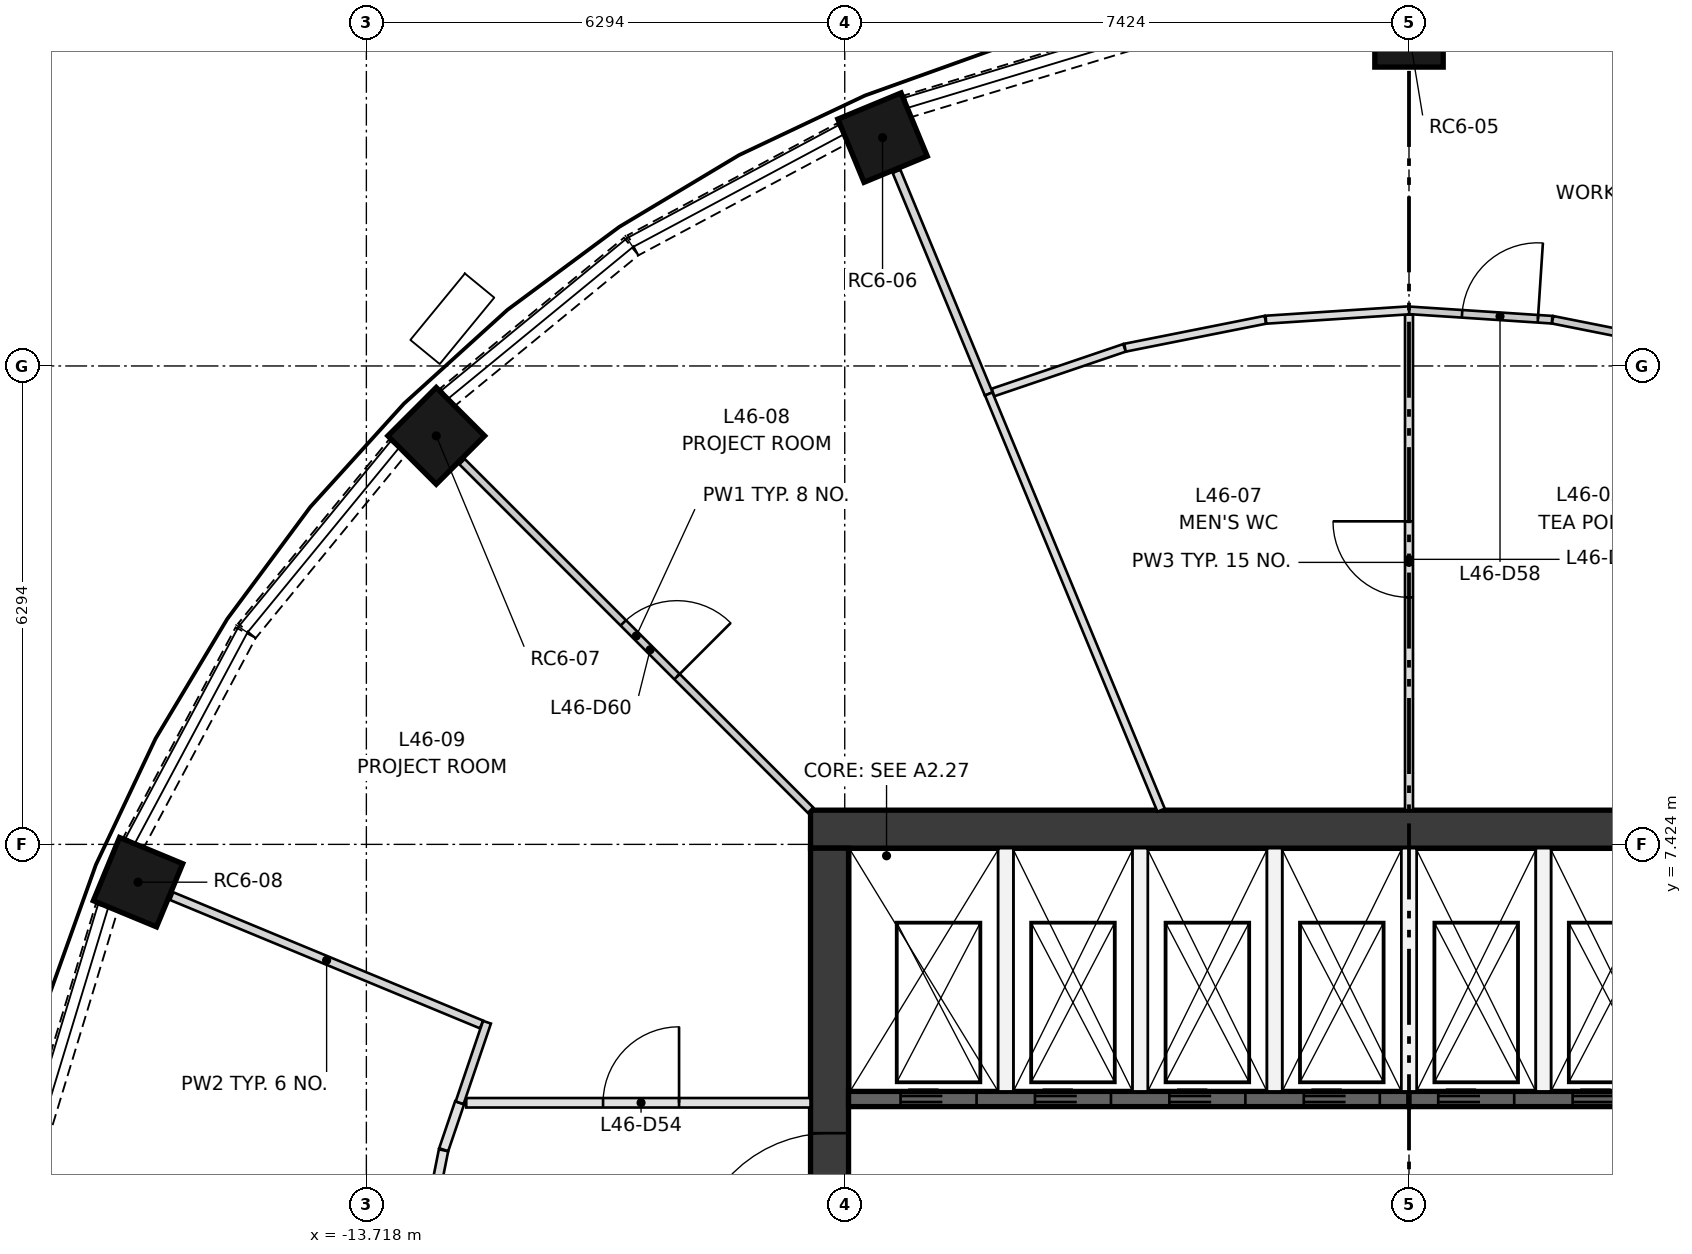
"""IFC4 building model, lengths in metres.
Left out: names, types, materials, properties, quantities, classifications, styles, units other than length and angle.
Written with IfcOpenShell. Run it as: python <this file> out.ifc"""

import sys

from ifc_helpers import new_model, si_unit, direction, frame, frame_2d, origin, origin_2d, place, context, subcontext, project, spatial, rectangle, extrude, element, fill, save


model = new_model("IFC4")
c1 = context("Model", 3, precision=1e-05, world=origin(), true_north=direction((0.0, 1.0)))
c2 = subcontext(c1, "Body", "Model", "MODEL_VIEW")
j1 = project(units=[si_unit("LENGTHUNIT", "METRE"), si_unit("PLANEANGLEUNIT", "RADIAN")], contexts=[c1])
p1 = place(None, origin())
s1 = spatial("IfcSite", under=j1, at=p1, CompositionType="ELEMENT")
p2 = place(p1, origin())
s2 = spatial("IfcBuilding", under=s1, at=p2, CompositionType="ELEMENT")
p3 = place(p2, frame((0.0, 0.0, 174.25)))
s3 = spatial("IfcBuildingStorey", under=s2, at=p3, CompositionType="ELEMENT", Elevation=174.25)
for number, where, z_axis, x_axis in (
    (1, (0.0, 18.1, 0.0), (0.0, 0.0, 1.0), (0.0, 1.0, 0.0)),
    (2, (-6.927, 16.722, 0.0), (0.0, 0.0, 1.0), (-0.383, 0.924, 0.0)),
    (3, (-12.799, 12.799, 0.0), (0.0, 0.0, 1.0), (-0.707, 0.707, 0.0)),
    (4, (-16.722, 6.927, 0.0), (0.0, 0.0, 1.0), (-0.924, 0.383, 0.0)),
):
    element("IfcColumn", number, at=place(p3, frame(where, z_axis=z_axis, x_axis=x_axis)), inside=s3, PredefinedType="COLUMN", context=c2, shape_type="SweptSolid", body=[
        extrude(rectangle(XDim=0.9, YDim=0.9, at=origin_2d()), origin(), (0.0, 0.0, 1.0), 3.35),
    ])
p4 = place(p3, frame((-7.874, 7.624, 0.0), z_axis=(0.0, 0.0, 1.0), x_axis=(1.0, 0.0, 0.0)))
e5 = element("IfcWall", 5, at=p4, inside=s3, PredefinedType="SHEAR", context=c2, shape_type="SweptSolid", body=[
    extrude(rectangle(XDim=15.748, YDim=0.5, at=frame_2d((7.874, 0.0))), origin(), (0.0, 0.0, 1.0), 3.35),
])
p5 = place(p3, frame((-7.624, -7.374, 0.0), z_axis=(0.0, 0.0, 1.0), x_axis=(0.0, 1.0, 0.0)))
e6 = element("IfcWall", 6, at=p5, inside=s3, PredefinedType="SHEAR", context=c2, shape_type="SweptSolid", body=[
    extrude(rectangle(XDim=14.748, YDim=0.5, at=frame_2d((7.374, 0.0))), origin(), (0.0, 0.0, 1.0), 3.35),
])
p6 = place(p5, frame((6.874, 0.0, 0.0)))
e7 = element("IfcOpeningElement", 7, at=p6, cuts=e6, PredefinedType="OPENING", context=c2, shape_type="SweptSolid", body=[
    extrude(rectangle(XDim=1.0, YDim=2.1, at=frame_2d((0.5, 1.05))), frame((0.0, 0.26, 0.0), z_axis=(0.0, -1.0, 0.0), x_axis=(1.0, 0.0, 0.0)), (0.0, 0.0, 1.0), 0.52),
])
p7 = place(p5, frame((3.75, 0.0, 0.0)))
e8 = element("IfcOpeningElement", 8, at=p7, cuts=e6, PredefinedType="OPENING", context=c2, shape_type="SweptSolid", body=[
    extrude(rectangle(XDim=1.8, YDim=2.1, at=frame_2d((0.9, 1.05))), frame((0.0, 0.26, 0.0), z_axis=(0.0, -1.0, 0.0), x_axis=(1.0, 0.0, 0.0)), (0.0, 0.0, 1.0), 0.52),
])
p8 = place(p5, frame((9.198, 0.0, 0.0)))
e9 = element("IfcOpeningElement", 9, at=p8, cuts=e6, PredefinedType="OPENING", context=c2, shape_type="SweptSolid", body=[
    extrude(rectangle(XDim=1.8, YDim=2.1, at=frame_2d((0.9, 1.05))), frame((0.0, 0.26, 0.0), z_axis=(0.0, -1.0, 0.0), x_axis=(1.0, 0.0, 0.0)), (0.0, 0.0, 1.0), 0.52),
])
p9 = place(p3, frame((-7.374, 4.074, 0.0), z_axis=(0.0, 0.0, 1.0), x_axis=(1.0, 0.0, 0.0)))
e10 = element("IfcWall", 10, at=p9, inside=s3, PredefinedType="SHEAR", context=c2, shape_type="SweptSolid", body=[
    extrude(rectangle(XDim=7.374, YDim=0.2, at=frame_2d((3.687, 0.0))), origin(), (0.0, 0.0, 1.0), 3.0),
])
p10 = place(p9, frame((0.684, 0.0, 0.0)))
e11 = element("IfcOpeningElement", 11, at=p10, cuts=e10, PredefinedType="OPENING", context=c2, shape_type="SweptSolid", body=[
    extrude(rectangle(XDim=1.0, YDim=2.1, at=frame_2d((0.5, 1.05))), frame((0.0, 0.11, 0.0), z_axis=(0.0, -1.0, 0.0), x_axis=(1.0, 0.0, 0.0)), (0.0, 0.0, 1.0), 0.22),
])
p11 = place(p9, frame((2.453, 0.0, 0.0)))
e12 = element("IfcOpeningElement", 12, at=p11, cuts=e10, PredefinedType="OPENING", context=c2, shape_type="SweptSolid", body=[
    extrude(rectangle(XDim=1.0, YDim=2.1, at=frame_2d((0.5, 1.05))), frame((0.0, 0.11, 0.0), z_axis=(0.0, -1.0, 0.0), x_axis=(1.0, 0.0, 0.0)), (0.0, 0.0, 1.0), 0.22),
])
p12 = place(p9, frame((4.221, 0.0, 0.0)))
e13 = element("IfcOpeningElement", 13, at=p12, cuts=e10, PredefinedType="OPENING", context=c2, shape_type="SweptSolid", body=[
    extrude(rectangle(XDim=1.0, YDim=2.1, at=frame_2d((0.5, 1.05))), frame((0.0, 0.11, 0.0), z_axis=(0.0, -1.0, 0.0), x_axis=(1.0, 0.0, 0.0)), (0.0, 0.0, 1.0), 0.22),
])
p13 = place(p9, frame((5.99, 0.0, 0.0)))
e14 = element("IfcOpeningElement", 14, at=p13, cuts=e10, PredefinedType="OPENING", context=c2, shape_type="SweptSolid", body=[
    extrude(rectangle(XDim=1.0, YDim=2.1, at=frame_2d((0.5, 1.05))), frame((0.0, 0.11, 0.0), z_axis=(0.0, -1.0, 0.0), x_axis=(1.0, 0.0, 0.0)), (0.0, 0.0, 1.0), 0.22),
])
p14 = place(p3, frame((0.0, 4.074, 0.0), z_axis=(0.0, 0.0, 1.0), x_axis=(1.0, 0.0, 0.0)))
e15 = element("IfcWall", 15, at=p14, inside=s3, PredefinedType="SHEAR", context=c2, shape_type="SweptSolid", body=[
    extrude(rectangle(XDim=7.374, YDim=0.2, at=frame_2d((3.687, 0.0))), origin(), (0.0, 0.0, 1.0), 3.0),
])
p15 = place(p14, frame((0.384, 0.0, 0.0)))
e16 = element("IfcOpeningElement", 16, at=p15, cuts=e15, PredefinedType="OPENING", context=c2, shape_type="SweptSolid", body=[
    extrude(rectangle(XDim=1.0, YDim=2.1, at=frame_2d((0.5, 1.05))), frame((0.0, 0.11, 0.0), z_axis=(0.0, -1.0, 0.0), x_axis=(1.0, 0.0, 0.0)), (0.0, 0.0, 1.0), 0.22),
])
p16 = place(p14, frame((2.153, 0.0, 0.0)))
e17 = element("IfcOpeningElement", 17, at=p16, cuts=e15, PredefinedType="OPENING", context=c2, shape_type="SweptSolid", body=[
    extrude(rectangle(XDim=1.0, YDim=2.1, at=frame_2d((0.5, 1.05))), frame((0.0, 0.11, 0.0), z_axis=(0.0, -1.0, 0.0), x_axis=(1.0, 0.0, 0.0)), (0.0, 0.0, 1.0), 0.22),
])
p17 = place(p14, frame((3.921, 0.0, 0.0)))
e18 = element("IfcOpeningElement", 18, at=p17, cuts=e15, PredefinedType="OPENING", context=c2, shape_type="SweptSolid", body=[
    extrude(rectangle(XDim=1.0, YDim=2.1, at=frame_2d((0.5, 1.05))), frame((0.0, 0.11, 0.0), z_axis=(0.0, -1.0, 0.0), x_axis=(1.0, 0.0, 0.0)), (0.0, 0.0, 1.0), 0.22),
])
p18 = place(p14, frame((5.79, 0.0, 0.0)))
e19 = element("IfcOpeningElement", 19, at=p18, cuts=e15, PredefinedType="OPENING", context=c2, shape_type="SweptSolid", body=[
    extrude(rectangle(XDim=0.8, YDim=2.1, at=frame_2d((0.4, 1.05))), frame((0.0, 0.11, 0.0), z_axis=(0.0, -1.0, 0.0), x_axis=(1.0, 0.0, 0.0)), (0.0, 0.0, 1.0), 0.22),
])
for number, where, z_axis, x_axis in (
    (20, (-5.305, 4.174, 0.0), (0.0, 0.0, 1.0), (0.0, 1.0, 0.0)),
    (21, (-3.537, 4.174, 0.0), (0.0, 0.0, 1.0), (0.0, 1.0, 0.0)),
    (22, (-1.769, 4.174, 0.0), (0.0, 0.0, 1.0), (0.0, 1.0, 0.0)),
    (23, (0.0, 4.174, 0.0), (0.0, 0.0, 1.0), (0.0, 1.0, 0.0)),
    (24, (1.769, 4.174, 0.0), (0.0, 0.0, 1.0), (0.0, 1.0, 0.0)),
):
    element("IfcWall", number, at=place(p3, frame(where, z_axis=z_axis, x_axis=x_axis)), inside=s3, PredefinedType="PARTITIONING", context=c2, shape_type="SweptSolid", body=[
        extrude(rectangle(XDim=3.2, YDim=0.2, at=frame_2d((1.6, 0.0))), origin(), (0.0, 0.0, 1.0), 3.0),
    ])
p19 = place(p3, frame((-3.604, 18.042, 0.0), z_axis=(0.0, 0.0, 1.0), x_axis=(-0.957001416136, -0.290083245834, 0.0)))
e25 = element("IfcWall", 25, at=p19, inside=s3, PredefinedType="SOLIDWALL", context=c2, shape_type="SweptSolid", body=[
    extrude(rectangle(XDim=3.127, YDim=0.3, at=frame_2d((1.563, 0.0))), origin(), (0.0, 0.0, 1.0), 0.9),
])
p20 = place(p3, frame((-7.452, 16.779, 0.0), z_axis=(0.0, 0.0, 1.0), x_axis=(-0.882024038027, -0.47120441036, 0.0)))
e26 = element("IfcWall", 26, at=p20, inside=s3, PredefinedType="SOLIDWALL", context=c2, shape_type="SweptSolid", body=[
    extrude(rectangle(XDim=3.125, YDim=0.3, at=frame_2d((1.562, 0.0))), origin(), (0.0, 0.0, 1.0), 0.9),
])
for number, where, z_axis, x_axis in (
    (27, (-10.234, 15.29, 0.0), (0.0, 0.0, 1.0), (-0.773, -0.634, 0.0)),
    (28, (-13.306, 12.651, 0.0), (0.0, 0.0, 1.0), (-0.634, -0.773, 0.0)),
):
    element("IfcWall", number, at=place(p3, frame(where, z_axis=z_axis, x_axis=x_axis)), inside=s3, PredefinedType="SOLIDWALL", context=c2, shape_type="SweptSolid", body=[
        extrude(rectangle(XDim=3.127, YDim=0.3, at=frame_2d((1.563, 0.0))), origin(), (0.0, 0.0, 1.0), 0.9),
    ])
p21 = place(p3, frame((-15.306, 10.209, 0.0), z_axis=(0.0, 0.0, 1.0), x_axis=(-0.47120441036, -0.882024038027, 0.0)))
e29 = element("IfcWall", 29, at=p21, inside=s3, PredefinedType="SOLIDWALL", context=c2, shape_type="SweptSolid", body=[
    extrude(rectangle(XDim=3.125, YDim=0.3, at=frame_2d((1.562, 0.0))), origin(), (0.0, 0.0, 1.0), 0.9),
])
p22 = place(p3, frame((-17.135, 6.596, 0.0), z_axis=(0.0, 0.0, 1.0), x_axis=(-0.290083245834, -0.957001416136, 0.0)))
e30 = element("IfcWall", 30, at=p22, inside=s3, PredefinedType="SOLIDWALL", context=c2, shape_type="SweptSolid", body=[
    extrude(rectangle(XDim=3.127, YDim=0.3, at=frame_2d((1.563, 0.0))), origin(), (0.0, 0.0, 1.0), 0.9),
])
p23 = place(p3, frame((-12.404, 4.024, 0.0), z_axis=(0.0, 0.0, 1.0), x_axis=(1.0, 0.0, 0.0)))
e31 = element("IfcWall", 31, at=p23, inside=s3, PredefinedType="PARTITIONING", context=c2, shape_type="SweptSolid", body=[
    extrude(rectangle(XDim=4.53, YDim=0.125, at=frame_2d((2.265, 0.0))), origin(), (0.0, 0.0, 1.0), 3.0),
])
p24 = place(p23, frame((1.8, 0.0, 0.0)))
e32 = element("IfcOpeningElement", 32, at=p24, cuts=e31, PredefinedType="OPENING", context=c2, shape_type="SweptSolid", body=[
    extrude(rectangle(XDim=1.0, YDim=2.1, at=frame_2d((0.5, 1.05))), frame((0.0, 0.073, 0.0), z_axis=(0.0, -1.0, 0.0), x_axis=(1.0, 0.0, 0.0)), (0.0, 0.0, 1.0), 0.145),
])
p25 = place(p3, frame((-13.037, 1.72, 0.0), z_axis=(0.0, 0.0, 1.0), x_axis=(0.195101249107, 0.980783106806, 0.0)))
e33 = element("IfcWall", 33, at=p25, inside=s3, PredefinedType="PARTITIONING", context=c2, shape_type="SweptSolid", body=[
    extrude(rectangle(XDim=1.712, YDim=0.125, at=frame_2d((0.856, 0.0))), origin(), (0.0, 0.0, 1.0), 3.0),
])
p26 = place(p3, frame((-12.701, 3.407, 0.0), z_axis=(0.0, 0.0, 1.0), x_axis=(0.321506357846, 0.946907419902, 0.0)))
e34 = element("IfcWall", 34, at=p26, inside=s3, PredefinedType="PARTITIONING", context=c2, shape_type="SweptSolid", body=[
    extrude(rectangle(XDim=0.652, YDim=0.125, at=frame_2d((0.326, 0.0))), origin(), (0.0, 0.0, 1.0), 3.0),
])
p27 = place(p3, frame((0.0, 14.45, 0.0), z_axis=(0.0, 0.0, 1.0), x_axis=(0.997862900294, -0.065342422802, 0.0)))
e35 = element("IfcWall", 35, at=p27, inside=s3, PredefinedType="PARTITIONING", context=c2, shape_type="SweptSolid", body=[
    extrude(rectangle(XDim=1.887, YDim=0.1, at=frame_2d((0.943, 0.0))), origin(), (0.0, 0.0, 1.0), 3.0),
])
p28 = place(p27, frame((0.7, 0.0, 0.0)))
e36 = element("IfcOpeningElement", 36, at=p28, cuts=e35, PredefinedType="OPENING", context=c2, shape_type="SweptSolid", body=[
    extrude(rectangle(XDim=1.0, YDim=2.1, at=frame_2d((0.5, 1.05))), frame((0.0, 0.06, 0.0), z_axis=(0.0, -1.0, 0.0), x_axis=(1.0, 0.0, 0.0)), (0.0, 0.0, 1.0), 0.12),
])
p29 = place(p3, frame((1.889, 14.326, 0.0), z_axis=(0.0, 0.0, 1.0), x_axis=(0.980789493394, -0.195069140684, 0.0)))
e37 = element("IfcWall", 37, at=p29, inside=s3, PredefinedType="PARTITIONING", context=c2, shape_type="SweptSolid", body=[
    extrude(rectangle(XDim=1.884, YDim=0.1, at=frame_2d((0.942, 0.0))), origin(), (0.0, 0.0, 1.0), 3.0),
])
p30 = place(p3, frame((0.0, 7.874, 0.0), z_axis=(0.0, 0.0, 1.0), x_axis=(0.0, 1.0, 0.0)))
e38 = element("IfcWall", 38, at=p30, inside=s3, PredefinedType="PARTITIONING", context=c2, shape_type="SweptSolid", body=[
    extrude(rectangle(XDim=6.52, YDim=0.105, at=frame_2d((3.26, 0.0))), origin(), (0.0, 0.0, 1.0), 3.0),
])
p31 = place(p30, frame((2.8, 0.0, 0.0)))
e39 = element("IfcOpeningElement", 39, at=p31, cuts=e38, PredefinedType="OPENING", context=c2, shape_type="SweptSolid", body=[
    extrude(rectangle(XDim=1.0, YDim=2.1, at=frame_2d((0.5, 1.05))), frame((0.0, 0.062, 0.0), z_axis=(0.0, -1.0, 0.0), x_axis=(1.0, 0.0, 0.0)), (0.0, 0.0, 1.0), 0.125),
])
p32 = place(p3, frame((-3.743, 13.957, 0.0), z_axis=(0.0, 0.0, 1.0), x_axis=(-0.946932980831, -0.321431065415, 0.0)))
e40 = element("IfcWall", 40, at=p32, inside=s3, PredefinedType="PARTITIONING", context=c2, shape_type="SweptSolid", body=[
    extrude(rectangle(XDim=1.828, YDim=0.105, at=frame_2d((0.914, 0.0))), origin(), (0.0, 0.0, 1.0), 3.0),
])
p33 = place(p3, frame((-1.889, 14.326, 0.0), z_axis=(0.0, 0.0, 1.0), x_axis=(-0.980784560384, -0.195093941763, 0.0)))
e41 = element("IfcWall", 41, at=p33, inside=s3, PredefinedType="PARTITIONING", context=c2, shape_type="SweptSolid", body=[
    extrude(rectangle(XDim=1.883, YDim=0.105, at=frame_2d((0.942, 0.0))), origin(), (0.0, 0.0, 1.0), 3.0),
])
p34 = place(p3, frame((0.0, 14.45, 0.0), z_axis=(0.0, 0.0, 1.0), x_axis=(-0.997862900294, -0.065342422802, 0.0)))
e42 = element("IfcWall", 42, at=p34, inside=s3, PredefinedType="PARTITIONING", context=c2, shape_type="SweptSolid", body=[
    extrude(rectangle(XDim=1.887, YDim=0.105, at=frame_2d((0.943, 0.0))), origin(), (0.0, 0.0, 1.0), 3.0),
])
p35 = place(p3, frame((-5.53, 13.35, 0.0), z_axis=(0.0, 0.0, 1.0), x_axis=(-0.382689618566, 0.923876970079, 0.0)))
e43 = element("IfcWall", 43, at=p35, inside=s3, PredefinedType="PARTITIONING", context=c2, shape_type="SweptSolid", body=[
    extrude(rectangle(XDim=3.17, YDim=0.11, at=frame_2d((1.585, 0.0))), origin(), (0.0, 0.0, 1.0), 3.0),
])
p36 = place(p3, frame((-3.261, 7.874, 0.0), z_axis=(0.0, 0.0, 1.0), x_axis=(-0.382690105068, 0.923876768559, 0.0)))
e44 = element("IfcWall", 44, at=p36, inside=s3, PredefinedType="PARTITIONING", context=c2, shape_type="SweptSolid", body=[
    extrude(rectangle(XDim=5.927, YDim=0.105, at=frame_2d((2.964, 0.0))), origin(), (0.0, 0.0, 1.0), 3.0),
])
p37 = place(p3, frame((-12.459, 12.459, 0.0), z_axis=(0.0, 0.0, 1.0), x_axis=(0.707106781187, -0.707106781187, 0.0)))
e45 = element("IfcWall", 45, at=p37, inside=s3, PredefinedType="PARTITIONING", context=c2, shape_type="SweptSolid", body=[
    extrude(rectangle(XDim=6.484, YDim=0.1, at=frame_2d((3.242, 0.0))), origin(), (0.0, 0.0, 1.0), 3.0),
])
p38 = place(p37, frame((3.0, 0.0, 0.0)))
e46 = element("IfcOpeningElement", 46, at=p38, cuts=e45, PredefinedType="OPENING", context=c2, shape_type="SweptSolid", body=[
    extrude(rectangle(XDim=1.0, YDim=2.1, at=frame_2d((0.5, 1.05))), frame((0.0, 0.06, 0.0), z_axis=(0.0, -1.0, 0.0), x_axis=(1.0, 0.0, 0.0)), (0.0, 0.0, 1.0), 0.12),
])
p39 = place(p3, frame((-12.491, 4.024, 0.0), z_axis=(0.0, 0.0, 1.0), x_axis=(0.321456988234, 0.946924181081, 0.0)))
e47 = element("IfcWall", 47, at=p39, inside=s3, PredefinedType="PARTITIONING", context=c2, shape_type="SweptSolid", body=[
    extrude(rectangle(XDim=1.119, YDim=0.11, at=frame_2d((0.56, 0.0))), origin(), (0.0, 0.0, 1.0), 3.0),
])
p40 = place(p3, frame((-12.203, 5.055, 0.0), z_axis=(0.0, 0.0, 1.0), x_axis=(-0.923869102729, 0.382708611117, 0.0)))
e48 = element("IfcWall", 48, at=p40, inside=s3, PredefinedType="PARTITIONING", context=c2, shape_type="SweptSolid", body=[
    extrude(rectangle(XDim=4.411, YDim=0.11, at=frame_2d((2.206, 0.0))), origin(), (0.0, 0.0, 1.0), 3.0),
])
p41 = place(p10, frame((1.0, 0.0, 0.0), z_axis=(0.0, 0.0, 1.0), x_axis=(-1.0, 0.0, 0.0)))
e49 = element("IfcDoor", 49, at=p41, inside=s3, OperationType="DOUBLE_DOOR_SLIDING", PredefinedType="DOOR", context=c2, shape_type="SweptSolid", body=[
    extrude(rectangle(XDim=1.0, YDim=2.1, at=frame_2d((0.5, 1.05))), frame((0.0, 0.025, 0.0), z_axis=(0.0, -1.0, 0.0), x_axis=(1.0, 0.0, 0.0)), (0.0, 0.0, 1.0), 0.05),
])
fill(e11, e49)
p42 = place(p11, frame((1.0, 0.0, 0.0), z_axis=(0.0, 0.0, 1.0), x_axis=(-1.0, 0.0, 0.0)))
e50 = element("IfcDoor", 50, at=p42, inside=s3, OperationType="DOUBLE_DOOR_SLIDING", PredefinedType="DOOR", context=c2, shape_type="SweptSolid", body=[
    extrude(rectangle(XDim=1.0, YDim=2.1, at=frame_2d((0.5, 1.05))), frame((0.0, 0.025, 0.0), z_axis=(0.0, -1.0, 0.0), x_axis=(1.0, 0.0, 0.0)), (0.0, 0.0, 1.0), 0.05),
])
fill(e12, e50)
p43 = place(p12, frame((1.0, 0.0, 0.0), z_axis=(0.0, 0.0, 1.0), x_axis=(-1.0, 0.0, 0.0)))
e51 = element("IfcDoor", 51, at=p43, inside=s3, OperationType="DOUBLE_DOOR_SLIDING", PredefinedType="DOOR", context=c2, shape_type="SweptSolid", body=[
    extrude(rectangle(XDim=1.0, YDim=2.1, at=frame_2d((0.5, 1.05))), frame((0.0, 0.025, 0.0), z_axis=(0.0, -1.0, 0.0), x_axis=(1.0, 0.0, 0.0)), (0.0, 0.0, 1.0), 0.05),
])
fill(e13, e51)
p44 = place(p13, frame((1.0, 0.0, 0.0), z_axis=(0.0, 0.0, 1.0), x_axis=(-1.0, 0.0, 0.0)))
e52 = element("IfcDoor", 52, at=p44, inside=s3, OperationType="DOUBLE_DOOR_SLIDING", PredefinedType="DOOR", context=c2, shape_type="SweptSolid", body=[
    extrude(rectangle(XDim=1.0, YDim=2.1, at=frame_2d((0.5, 1.05))), frame((0.0, 0.025, 0.0), z_axis=(0.0, -1.0, 0.0), x_axis=(1.0, 0.0, 0.0)), (0.0, 0.0, 1.0), 0.05),
])
fill(e14, e52)
p45 = place(p15, frame((1.0, 0.0, 0.0), z_axis=(0.0, 0.0, 1.0), x_axis=(-1.0, 0.0, 0.0)))
e53 = element("IfcDoor", 53, at=p45, inside=s3, OperationType="DOUBLE_DOOR_SLIDING", PredefinedType="DOOR", context=c2, shape_type="SweptSolid", body=[
    extrude(rectangle(XDim=1.0, YDim=2.1, at=frame_2d((0.5, 1.05))), frame((0.0, 0.025, 0.0), z_axis=(0.0, -1.0, 0.0), x_axis=(1.0, 0.0, 0.0)), (0.0, 0.0, 1.0), 0.05),
])
fill(e16, e53)
p46 = place(p16, frame((1.0, 0.0, 0.0), z_axis=(0.0, 0.0, 1.0), x_axis=(-1.0, 0.0, 0.0)))
e54 = element("IfcDoor", 54, at=p46, inside=s3, OperationType="DOUBLE_DOOR_SLIDING", PredefinedType="DOOR", context=c2, shape_type="SweptSolid", body=[
    extrude(rectangle(XDim=1.0, YDim=2.1, at=frame_2d((0.5, 1.05))), frame((0.0, 0.025, 0.0), z_axis=(0.0, -1.0, 0.0), x_axis=(1.0, 0.0, 0.0)), (0.0, 0.0, 1.0), 0.05),
])
fill(e17, e54)
p47 = place(p8, origin())
e55 = element("IfcDoor", 55, at=p47, inside=s3, OperationType="DOUBLE_DOOR_SINGLE_SWING", PredefinedType="DOOR", context=c2, shape_type="SweptSolid", body=[
    extrude(rectangle(XDim=1.8, YDim=2.1, at=frame_2d((0.9, 1.05))), frame((0.0, 0.025, 0.0), z_axis=(0.0, -1.0, 0.0), x_axis=(1.0, 0.0, 0.0)), (0.0, 0.0, 1.0), 0.05),
])
fill(e9, e55)
p48 = place(p24, origin())
e56 = element("IfcDoor", 56, at=p48, inside=s3, OperationType="SINGLE_SWING_RIGHT", PredefinedType="DOOR", context=c2, shape_type="SweptSolid", body=[
    extrude(rectangle(XDim=1.0, YDim=2.1, at=frame_2d((0.5, 1.05))), frame((0.0, 0.025, 0.0), z_axis=(0.0, -1.0, 0.0), x_axis=(1.0, 0.0, 0.0)), (0.0, 0.0, 1.0), 0.05),
])
fill(e32, e56)
p49 = place(p28, origin())
e57 = element("IfcDoor", 57, at=p49, inside=s3, OperationType="SINGLE_SWING_RIGHT", PredefinedType="DOOR", context=c2, shape_type="SweptSolid", body=[
    extrude(rectangle(XDim=1.0, YDim=2.1, at=frame_2d((0.5, 1.05))), frame((0.0, 0.025, 0.0), z_axis=(0.0, -1.0, 0.0), x_axis=(1.0, 0.0, 0.0)), (0.0, 0.0, 1.0), 0.05),
])
fill(e36, e57)
p50 = place(p31, origin())
e58 = element("IfcDoor", 58, at=p50, inside=s3, OperationType="SINGLE_SWING_RIGHT", PredefinedType="DOOR", context=c2, shape_type="SweptSolid", body=[
    extrude(rectangle(XDim=1.0, YDim=2.1, at=frame_2d((0.5, 1.05))), frame((0.0, 0.025, 0.0), z_axis=(0.0, -1.0, 0.0), x_axis=(1.0, 0.0, 0.0)), (0.0, 0.0, 1.0), 0.05),
])
fill(e39, e58)
p51 = place(p38, origin())
e59 = element("IfcDoor", 59, at=p51, inside=s3, OperationType="SINGLE_SWING_RIGHT", PredefinedType="DOOR", context=c2, shape_type="SweptSolid", body=[
    extrude(rectangle(XDim=1.0, YDim=2.1, at=frame_2d((0.5, 1.05))), frame((0.0, 0.025, 0.0), z_axis=(0.0, -1.0, 0.0), x_axis=(1.0, 0.0, 0.0)), (0.0, 0.0, 1.0), 0.05),
])
fill(e46, e59)
save(model, sys.argv[1])
